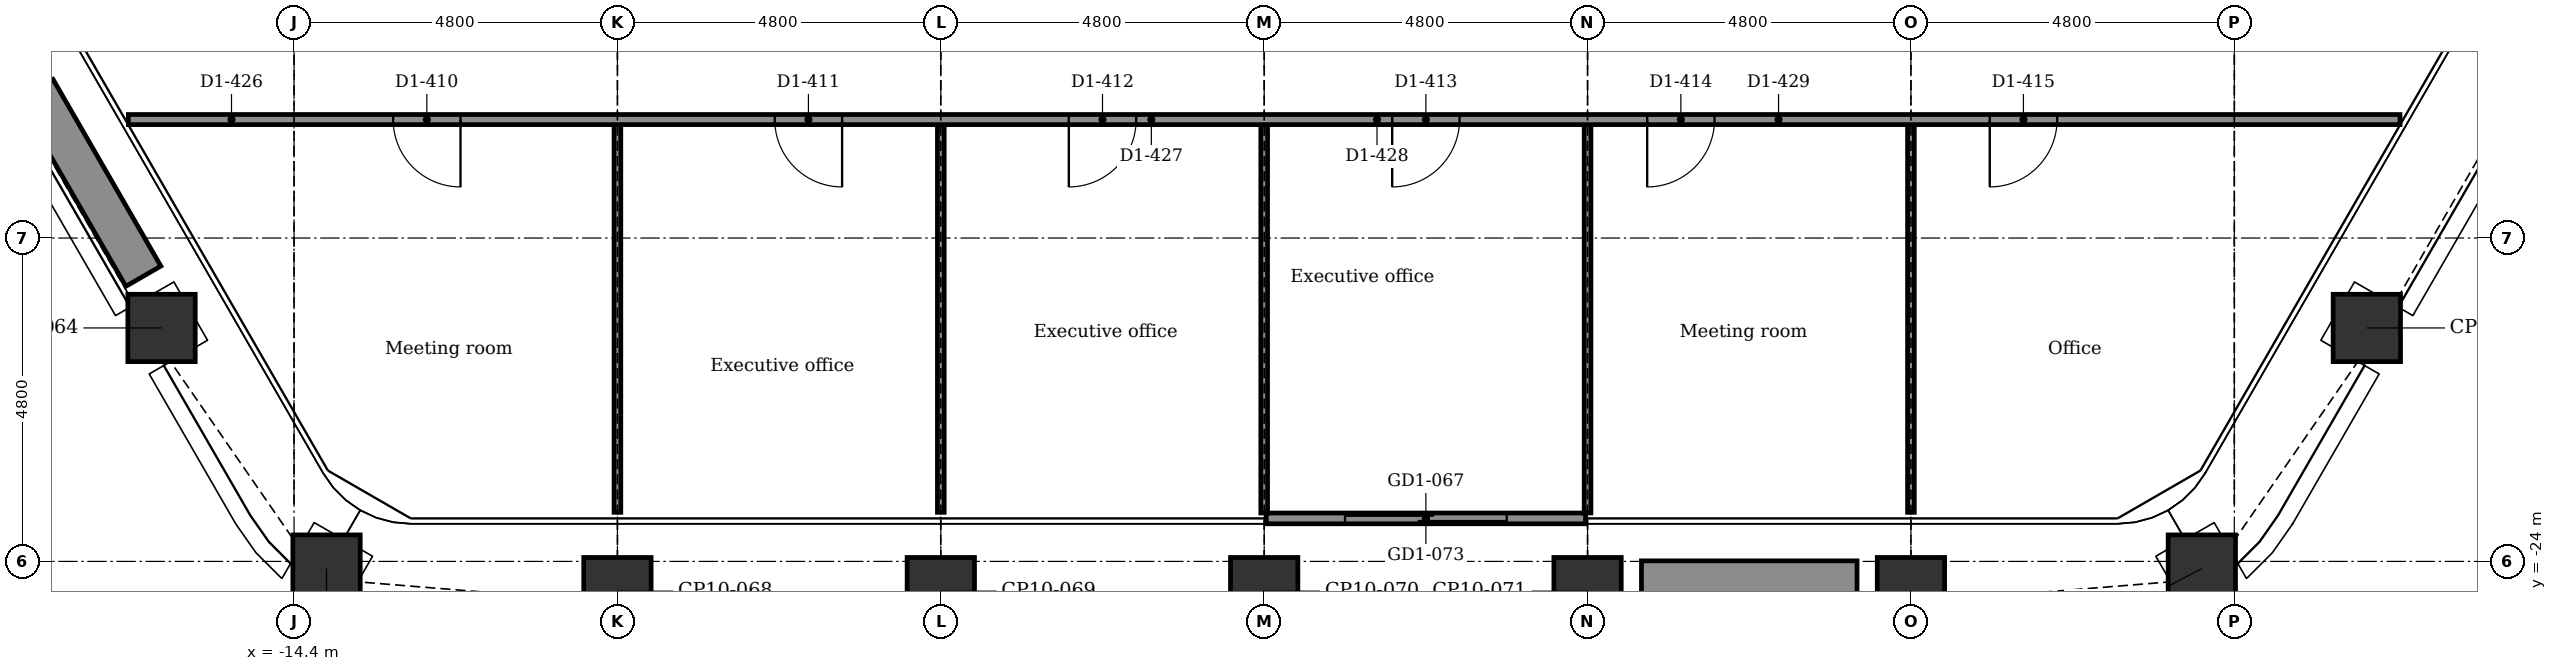
"""IFC4 building model, lengths in metres.
Left out: names, types, materials, properties, quantities, classifications, styles, units other than length and angle.
Written with IfcOpenShell. Run it as: python <this file> out.ifc"""

import sys

from ifc_helpers import new_model, si_unit, direction, frame, frame_2d, origin, origin_2d, place, context, subcontext, project, spatial, rectangle, extrude, element, fill, save


model = new_model("IFC4")
c1 = context("Model", 3, precision=1e-05, world=origin(), true_north=direction((0.0, 1.0)))
c2 = subcontext(c1, "Body", "Model", "MODEL_VIEW")
j1 = project(units=[si_unit("LENGTHUNIT", "METRE"), si_unit("PLANEANGLEUNIT", "RADIAN")], contexts=[c1])
p1 = place(None, origin())
s1 = spatial("IfcSite", under=j1, at=p1, CompositionType="ELEMENT")
p2 = place(p1, origin())
s2 = spatial("IfcBuilding", under=s1, at=p2, CompositionType="ELEMENT")
p3 = place(p2, frame((0.0, 0.0, 138.8)))
s3 = spatial("IfcBuildingStorey", under=s2, at=p3, CompositionType="ELEMENT", Elevation=138.8)
for number, where, z_axis, x_axis in (
    (1, (16.367, -20.535, -0.15), (0.0, 0.0, 1.0), (0.5, 0.866, 0.0)),
    (2, (13.918, -24.107, -0.15), (0.0, 0.0, 1.0), (0.866, 0.5, 0.0)),
    (3, (9.6, -24.442, -0.15), (0.0, 0.0, 1.0), (1.0, 0.0, 0.0)),
    (4, (4.8, -24.442, -0.15), (0.0, 0.0, 1.0), (1.0, 0.0, 0.0)),
    (5, (0.0, -24.442, -0.15), (0.0, 0.0, 1.0), (1.0, 0.0, 0.0)),
    (6, (-4.8, -24.442, -0.15), (0.0, 0.0, 1.0), (1.0, 0.0, 0.0)),
    (7, (-9.6, -24.442, -0.15), (0.0, 0.0, 1.0), (1.0, 0.0, 0.0)),
    (8, (-13.918, -24.107, -0.15), (0.0, 0.0, 1.0), (0.5, 0.866, 0.0)),
    (9, (-16.367, -20.535, -0.15), (0.0, 0.0, 1.0), (0.866, 0.5, 0.0)),
):
    element("IfcColumn", number, at=place(p3, frame(where, z_axis=z_axis, x_axis=x_axis)), inside=s3, PredefinedType="COLUMN", context=c2, shape_type="SweptSolid", body=[
        extrude(rectangle(XDim=1.0, YDim=1.0, at=origin_2d()), origin(), (0.0, 0.0, 1.0), 3.9),
    ])
p4 = place(p3, frame((4.77, -23.362, 0.0), z_axis=(0.0, 0.0, 1.0), x_axis=(-1.0, 0.0, 0.0)))
e10 = element("IfcWall", 10, at=p4, inside=s3, PredefinedType="PARTITIONING", context=c2, shape_type="SweptSolid", body=[
    extrude(rectangle(XDim=4.74, YDim=0.16, at=frame_2d((2.37, 0.0))), origin(), (0.0, 0.0, 1.0), 3.75),
])
p5 = place(p4, frame((1.17, 0.0, 0.0)))
e11 = element("IfcOpeningElement", 11, at=p5, cuts=e10, PredefinedType="OPENING", context=c2, shape_type="SweptSolid", body=[
    extrude(rectangle(XDim=2.4, YDim=2.4, at=frame_2d((1.2, 1.2))), frame((0.0, 0.09, 0.0), z_axis=(0.0, -1.0, 0.0), x_axis=(1.0, 0.0, 0.0)), (0.0, 0.0, 1.0), 0.18),
])
for number, where, z_axis, x_axis in (
    (12, (8.8, -24.292, 0.0), (0.0, 0.0, 1.0), (-1.0, 0.0, 0.0)),
    (13, (-16.637, -19.767, 0.0), (0.0, 0.0, 1.0), (-0.5, 0.866, 0.0)),
):
    element("IfcWall", number, at=place(p3, frame(where, z_axis=z_axis, x_axis=x_axis)), inside=s3, PredefinedType="USERDEFINED", context=c2, shape_type="SweptSolid", body=[
        extrude(rectangle(XDim=3.2, YDim=0.6, at=frame_2d((1.6, 0.0))), origin(), (0.0, 0.0, 1.0), 0.7),
    ])
p6 = place(p3, frame((9.6, -23.271, 0.0), z_axis=(0.0, 0.0, 1.0), x_axis=(0.0, 1.0, 0.0)))
e14 = element("IfcWall", 14, at=p6, inside=s3, PredefinedType="PARTITIONING", context=c2, shape_type="SweptSolid", body=[
    extrude(rectangle(XDim=5.83, YDim=0.1, at=frame_2d((2.915, 0.0))), origin(), (0.0, 0.0, 1.0), 3.066),
])
for number, where, z_axis, x_axis in (
    (15, (4.8, -23.281, 0.0), (0.0, 0.0, 1.0), (0.0, 1.0, 0.0)),
    (16, (0.0, -23.281, 0.0), (0.0, 0.0, 1.0), (0.0, 1.0, 0.0)),
):
    element("IfcWall", number, at=place(p3, frame(where, z_axis=z_axis, x_axis=x_axis)), inside=s3, PredefinedType="PARTITIONING", context=c2, shape_type="SweptSolid", body=[
        extrude(rectangle(XDim=5.84, YDim=0.1, at=frame_2d((2.92, 0.0))), origin(), (0.0, 0.0, 1.0), 3.066),
    ])
for number, where, z_axis, x_axis in (
    (17, (-4.8, -23.271, 0.0), (0.0, 0.0, 1.0), (0.0, 1.0, 0.0)),
    (18, (-9.6, -23.271, 0.0), (0.0, 0.0, 1.0), (0.0, 1.0, 0.0)),
):
    element("IfcWall", number, at=place(p3, frame(where, z_axis=z_axis, x_axis=x_axis)), inside=s3, PredefinedType="PARTITIONING", context=c2, shape_type="SweptSolid", body=[
        extrude(rectangle(XDim=5.83, YDim=0.1, at=frame_2d((2.915, 0.0))), origin(), (0.0, 0.0, 1.0), 3.066),
    ])
p7 = place(p3, frame((-16.86, -17.441, 0.0), z_axis=(0.0, 0.0, 1.0), x_axis=(1.0, 0.0, 0.0)))
e19 = element("IfcWall", 19, at=p7, inside=s3, PredefinedType="PARTITIONING", context=c2, shape_type="SweptSolid", body=[
    extrude(rectangle(XDim=33.719, YDim=0.15, at=frame_2d((16.86, 0.0))), origin(), (0.0, 0.0, 1.0), 3.75),
])
p8 = place(p7, frame((3.93, 0.0, 0.0)))
e20 = element("IfcOpeningElement", 20, at=p8, cuts=e19, PredefinedType="OPENING", context=c2, shape_type="SweptSolid", body=[
    extrude(rectangle(XDim=1.0, YDim=2.1, at=frame_2d((0.5, 1.05))), frame((0.0, 0.085, 0.0), z_axis=(0.0, -1.0, 0.0), x_axis=(1.0, 0.0, 0.0)), (0.0, 0.0, 1.0), 0.17),
])
p9 = place(p7, frame((9.594, 0.0, 0.0)))
e21 = element("IfcOpeningElement", 21, at=p9, cuts=e19, PredefinedType="OPENING", context=c2, shape_type="SweptSolid", body=[
    extrude(rectangle(XDim=1.0, YDim=2.1, at=frame_2d((0.5, 1.05))), frame((0.0, 0.085, 0.0), z_axis=(0.0, -1.0, 0.0), x_axis=(1.0, 0.0, 0.0)), (0.0, 0.0, 1.0), 0.17),
])
p10 = place(p7, frame((13.959, 0.0, 0.0)))
e22 = element("IfcOpeningElement", 22, at=p10, cuts=e19, PredefinedType="OPENING", context=c2, shape_type="SweptSolid", body=[
    extrude(rectangle(XDim=1.0, YDim=2.1, at=frame_2d((0.5, 1.05))), frame((0.0, 0.085, 0.0), z_axis=(0.0, -1.0, 0.0), x_axis=(1.0, 0.0, 0.0)), (0.0, 0.0, 1.0), 0.17),
])
p11 = place(p7, frame((18.76, 0.0, 0.0)))
e23 = element("IfcOpeningElement", 23, at=p11, cuts=e19, PredefinedType="OPENING", context=c2, shape_type="SweptSolid", body=[
    extrude(rectangle(XDim=1.0, YDim=2.1, at=frame_2d((0.5, 1.05))), frame((0.0, 0.085, 0.0), z_axis=(0.0, -1.0, 0.0), x_axis=(1.0, 0.0, 0.0)), (0.0, 0.0, 1.0), 0.17),
])
p12 = place(p7, frame((22.544, 0.0, 0.0)))
e24 = element("IfcOpeningElement", 24, at=p12, cuts=e19, PredefinedType="OPENING", context=c2, shape_type="SweptSolid", body=[
    extrude(rectangle(XDim=1.0, YDim=2.1, at=frame_2d((0.5, 1.05))), frame((0.0, 0.085, 0.0), z_axis=(0.0, -1.0, 0.0), x_axis=(1.0, 0.0, 0.0)), (0.0, 0.0, 1.0), 0.17),
])
p13 = place(p7, frame((27.629, 0.0, 0.0)))
e25 = element("IfcOpeningElement", 25, at=p13, cuts=e19, PredefinedType="OPENING", context=c2, shape_type="SweptSolid", body=[
    extrude(rectangle(XDim=1.0, YDim=2.1, at=frame_2d((0.5, 1.05))), frame((0.0, 0.085, 0.0), z_axis=(0.0, -1.0, 0.0), x_axis=(1.0, 0.0, 0.0)), (0.0, 0.0, 1.0), 0.17),
])
p14 = place(p5, origin())
e26 = element("IfcDoor", 26, at=p14, inside=s3, OperationType="DOUBLE_DOOR_SLIDING", PredefinedType="DOOR", context=c2, shape_type="SweptSolid", body=[
    extrude(rectangle(XDim=2.4, YDim=2.4, at=frame_2d((1.2, 1.2))), frame((0.0, 0.025, 0.0), z_axis=(0.0, -1.0, 0.0), x_axis=(1.0, 0.0, 0.0)), (0.0, 0.0, 1.0), 0.05),
])
fill(e11, e26)
p15 = place(p8, frame((1.0, 0.0, 0.0), z_axis=(0.0, 0.0, 1.0), x_axis=(-1.0, 0.0, 0.0)))
e27 = element("IfcDoor", 27, at=p15, inside=s3, OperationType="SINGLE_SWING_RIGHT", PredefinedType="DOOR", context=c2, shape_type="SweptSolid", body=[
    extrude(rectangle(XDim=1.0, YDim=2.1, at=frame_2d((0.5, 1.05))), frame((0.0, 0.025, 0.0), z_axis=(0.0, -1.0, 0.0), x_axis=(1.0, 0.0, 0.0)), (0.0, 0.0, 1.0), 0.05),
])
fill(e20, e27)
p16 = place(p9, frame((1.0, 0.0, 0.0), z_axis=(0.0, 0.0, 1.0), x_axis=(-1.0, 0.0, 0.0)))
e28 = element("IfcDoor", 28, at=p16, inside=s3, OperationType="SINGLE_SWING_RIGHT", PredefinedType="DOOR", context=c2, shape_type="SweptSolid", body=[
    extrude(rectangle(XDim=1.0, YDim=2.1, at=frame_2d((0.5, 1.05))), frame((0.0, 0.025, 0.0), z_axis=(0.0, -1.0, 0.0), x_axis=(1.0, 0.0, 0.0)), (0.0, 0.0, 1.0), 0.05),
])
fill(e21, e28)
p17 = place(p10, frame((1.0, 0.0, 0.0), z_axis=(0.0, 0.0, 1.0), x_axis=(-1.0, 0.0, 0.0)))
e29 = element("IfcDoor", 29, at=p17, inside=s3, OperationType="SINGLE_SWING_LEFT", PredefinedType="DOOR", context=c2, shape_type="SweptSolid", body=[
    extrude(rectangle(XDim=1.0, YDim=2.1, at=frame_2d((0.5, 1.05))), frame((0.0, 0.025, 0.0), z_axis=(0.0, -1.0, 0.0), x_axis=(1.0, 0.0, 0.0)), (0.0, 0.0, 1.0), 0.05),
])
fill(e22, e29)
p18 = place(p11, frame((1.0, 0.0, 0.0), z_axis=(0.0, 0.0, 1.0), x_axis=(-1.0, 0.0, 0.0)))
e30 = element("IfcDoor", 30, at=p18, inside=s3, OperationType="SINGLE_SWING_LEFT", PredefinedType="DOOR", context=c2, shape_type="SweptSolid", body=[
    extrude(rectangle(XDim=1.0, YDim=2.1, at=frame_2d((0.5, 1.05))), frame((0.0, 0.025, 0.0), z_axis=(0.0, -1.0, 0.0), x_axis=(1.0, 0.0, 0.0)), (0.0, 0.0, 1.0), 0.05),
])
fill(e23, e30)
p19 = place(p12, frame((1.0, 0.0, 0.0), z_axis=(0.0, 0.0, 1.0), x_axis=(-1.0, 0.0, 0.0)))
e31 = element("IfcDoor", 31, at=p19, inside=s3, OperationType="SINGLE_SWING_LEFT", PredefinedType="DOOR", context=c2, shape_type="SweptSolid", body=[
    extrude(rectangle(XDim=1.0, YDim=2.1, at=frame_2d((0.5, 1.05))), frame((0.0, 0.025, 0.0), z_axis=(0.0, -1.0, 0.0), x_axis=(1.0, 0.0, 0.0)), (0.0, 0.0, 1.0), 0.05),
])
fill(e24, e31)
p20 = place(p13, frame((1.0, 0.0, 0.0), z_axis=(0.0, 0.0, 1.0), x_axis=(-1.0, 0.0, 0.0)))
e32 = element("IfcDoor", 32, at=p20, inside=s3, OperationType="SINGLE_SWING_LEFT", PredefinedType="DOOR", context=c2, shape_type="SweptSolid", body=[
    extrude(rectangle(XDim=1.0, YDim=2.1, at=frame_2d((0.5, 1.05))), frame((0.0, 0.025, 0.0), z_axis=(0.0, -1.0, 0.0), x_axis=(1.0, 0.0, 0.0)), (0.0, 0.0, 1.0), 0.05),
])
fill(e25, e32)
save(model, sys.argv[1])
